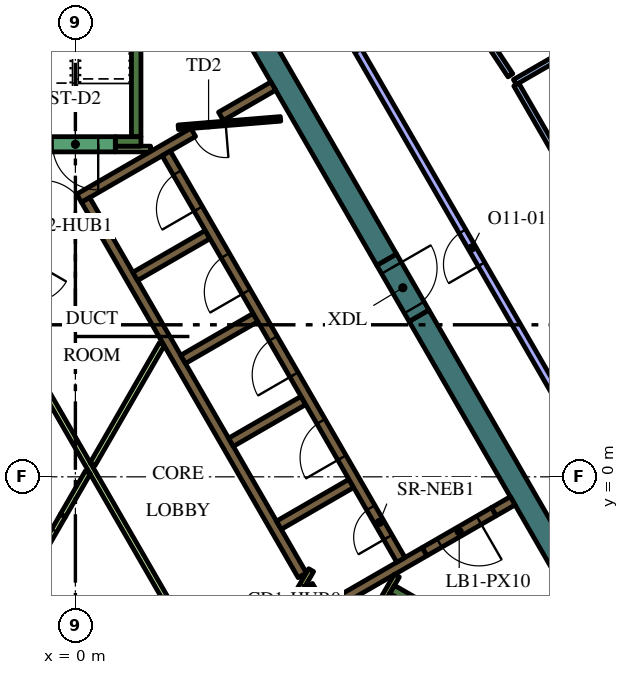
"""IFC4 building model, lengths in metres.
Left out: names, types, materials, properties, quantities, classifications, styles, units other than length and angle.
Written with IfcOpenShell. Run it as: python <this file> out.ifc"""

import sys

from ifc_helpers import new_model, si_unit, direction, frame, frame_2d, origin, place, context, subcontext, project, spatial, rectangle, extrude, element, fill, save


model = new_model("IFC4")
c1 = context("Model", 3, precision=1e-05, world=origin(), true_north=direction((0.0, 1.0)))
c2 = subcontext(c1, "Body", "Model", "MODEL_VIEW")
j1 = project(units=[si_unit("LENGTHUNIT", "METRE"), si_unit("PLANEANGLEUNIT", "RADIAN")], contexts=[c1])
p1 = place(None, origin())
s1 = spatial("IfcSite", under=j1, at=p1, CompositionType="ELEMENT")
p2 = place(p1, origin())
s2 = spatial("IfcBuilding", under=s1, at=p2, CompositionType="ELEMENT")
p3 = place(p2, frame((0.0, 0.0, 275.4)))
s3 = spatial("IfcBuildingStorey", under=s2, at=p3, CompositionType="ELEMENT", Elevation=275.4)
for number, where, z_axis, x_axis in (
    (1, (9.042, 4.239, 0.0), (0.0, 0.0, 1.0), (0.5, -0.866, 0.0)),
    (2, (1.989, 16.456, 0.0), (0.0, 0.0, 1.0), (0.5, -0.866, 0.0)),
):
    element("IfcWall", number, at=place(p3, frame(where, z_axis=z_axis, x_axis=x_axis)), inside=s3, PredefinedType="SOLIDWALL", context=c2, shape_type="SweptSolid", body=[
        extrude(rectangle(XDim=12.406, YDim=0.6, at=frame_2d((6.203, 0.0))), origin(), (0.0, 0.0, 1.0), 4.2),
    ])
p4 = place(p3, frame((8.334, -2.964, 0.0), z_axis=(0.0, 0.0, 1.0), x_axis=(0.866016039709, -0.500016218704, 0.0)))
e3 = element("IfcWall", 3, at=p4, inside=s3, PredefinedType="SOLIDWALL", context=c2, shape_type="SweptSolid", body=[
    extrude(rectangle(XDim=7.05, YDim=0.25, at=frame_2d((3.525, 0.0))), origin(), (0.0, 0.0, 1.0), 4.2),
])
p5 = place(p3, frame((8.168, -3.503, 0.0), z_axis=(0.0, 0.0, 1.0), x_axis=(0.49972245349, 0.866185586049, 0.0)))
e4 = element("IfcWall", 4, at=p5, inside=s3, PredefinedType="SOLIDWALL", context=c2, shape_type="SweptSolid", body=[
    extrude(rectangle(XDim=0.425, YDim=0.25, at=frame_2d((0.212, 0.0))), origin(), (0.0, 0.0, 1.0), 4.2),
])
p6 = place(p3, frame((1.6, 8.95, 0.0), z_axis=(0.0, 0.0, 1.0), x_axis=(0.0, 1.0, 0.0)))
e5 = element("IfcWall", 5, at=p6, inside=s3, PredefinedType="SOLIDWALL", context=c2, shape_type="SweptSolid", body=[
    extrude(rectangle(XDim=6.8, YDim=0.25, at=frame_2d((3.4, 0.0))), origin(), (0.0, 0.0, 1.0), 4.2),
])
p7 = place(p3, frame((1.05, 8.825, 0.0), z_axis=(0.0, 0.0, 1.0), x_axis=(1.0, 0.0, 0.0)))
e6 = element("IfcWall", 6, at=p7, inside=s3, PredefinedType="SOLIDWALL", context=c2, shape_type="SweptSolid", body=[
    extrude(rectangle(XDim=0.675, YDim=0.25, at=frame_2d((0.337, 0.0))), origin(), (0.0, 0.0, 1.0), 4.2),
])
p8 = place(p3, frame((9.19, -1.969, 0.0), z_axis=(0.0, 0.0, 1.0), x_axis=(-0.866057109641, -0.499945079824, 0.0)))
e7 = element("IfcWall", 7, at=p8, inside=s3, PredefinedType="SOLIDWALL", context=c2, shape_type="SweptSolid", body=[
    extrude(rectangle(XDim=3.291, YDim=0.25, at=frame_2d((1.646, 0.0))), origin(), (0.0, 0.0, 1.0), 4.2),
])
p9 = place(p3, frame((6.13, -2.867, 0.0), z_axis=(0.0, 0.0, 1.0), x_axis=(0.500160776593, -0.865932559475, 0.0)))
e8 = element("IfcWall", 8, at=p9, inside=s3, PredefinedType="SOLIDWALL", context=c2, shape_type="SweptSolid", body=[
    extrude(rectangle(XDim=0.627, YDim=0.25, at=frame_2d((0.313, 0.0))), origin(), (0.0, 0.0, 1.0), 4.2),
])
p10 = place(p3, frame((11.507, -0.631, 0.0), z_axis=(0.0, 0.0, 1.0), x_axis=(-0.866093731455, -0.499881634324, 0.0)))
e9 = element("IfcWall", 9, at=p10, inside=s3, PredefinedType="SOLIDWALL", context=c2, shape_type="SweptSolid", body=[
    extrude(rectangle(XDim=0.575, YDim=0.25, at=frame_2d((0.288, 0.0))), origin(), (0.0, 0.0, 1.0), 4.2),
])
p11 = place(p3, frame((3.1, 9.064, 0.0), z_axis=(0.0, 0.0, 1.0), x_axis=(-0.866033137035, -0.499986605379, 0.0)))
e10 = element("IfcWall", 10, at=p11, inside=s3, PredefinedType="SOLIDWALL", context=c2, shape_type="SweptSolid", body=[
    extrude(rectangle(XDim=3.467, YDim=0.25, at=frame_2d((1.733, 0.0))), origin(), (0.0, 0.0, 1.0), 4.2),
])
p12 = place(p3, frame((0.268, 7.285, 0.0), z_axis=(0.0, 0.0, 1.0), x_axis=(0.500098681536, -0.865968422476, 0.0)))
e11 = element("IfcWall", 11, at=p12, inside=s3, PredefinedType="SOLIDWALL", context=c2, shape_type="SweptSolid", body=[
    extrude(rectangle(XDim=0.636, YDim=0.25, at=frame_2d((0.318, 0.0))), origin(), (0.0, 0.0, 1.0), 4.2),
])
p13 = place(p3, frame((5.97, -2.591, 0.0), z_axis=(0.0, 0.0, 1.0), x_axis=(-0.499994469932, 0.866028596547, 0.0)))
e12 = element("IfcWall", 12, at=p13, inside=s3, PredefinedType="SOLIDWALL", context=c2, shape_type="SweptSolid", body=[
    extrude(rectangle(XDim=10.488, YDim=0.25, at=frame_2d((5.244, 0.0))), origin(), (0.0, 0.0, 1.0), 4.2),
])
p14 = place(p3, frame((1.574, 5.274, 0.0), z_axis=(0.0, 0.0, 1.0), x_axis=(0.866028486751, 0.499994660107, 0.0)))
e13 = element("IfcWall", 13, at=p14, inside=s3, PredefinedType="SOLIDWALL", context=c2, shape_type="SweptSolid", body=[
    extrude(rectangle(XDim=2.2, YDim=0.25, at=frame_2d((1.1, 0.0))), origin(), (0.0, 0.0, 1.0), 4.2),
])
for number, where, z_axis, x_axis in (
    (14, (2.834, 3.091, 0.0), (0.0, 0.0, 1.0), (0.866, 0.5, 0.0)),
    (15, (4.094, 0.909, 0.0), (0.0, 0.0, 1.0), (0.866, 0.5, 0.0)),
    (16, (5.354, -1.274, 0.0), (0.0, 0.0, 1.0), (0.866, 0.5, 0.0)),
):
    element("IfcWall", number, at=place(p3, frame(where, z_axis=z_axis, x_axis=x_axis)), inside=s3, PredefinedType="SOLIDWALL", context=c2, shape_type="SweptSolid", body=[
        extrude(rectangle(XDim=2.2, YDim=0.25, at=frame_2d((1.1, 0.0))), origin(), (0.0, 0.0, 1.0), 4.2),
    ])
p15 = place(p3, frame((3.83, 9.486, 0.0), z_axis=(0.0, 0.0, 1.0), x_axis=(0.865986202621, 0.500067892261, 0.0)))
e17 = element("IfcWall", 17, at=p15, inside=s3, PredefinedType="SOLIDWALL", context=c2, shape_type="SweptSolid", body=[
    extrude(rectangle(XDim=1.591, YDim=0.25, at=frame_2d((0.795, 0.0))), origin(), (0.0, 0.0, 1.0), 4.2),
])
p16 = place(p3, frame((1.05, 8.625, 0.0), z_axis=(0.0, 0.0, 1.0), x_axis=(1.0, 0.0, 0.0)))
e18 = element("IfcWall", 18, at=p16, inside=s3, PredefinedType="PARTITIONING", context=c2, shape_type="SweptSolid", body=[
    extrude(rectangle(XDim=0.929, YDim=0.15, at=frame_2d((0.464, 0.0))), origin(), (0.0, 0.0, 1.0), 3.55),
])
p17 = place(p3, frame((8.459, -2.599, 0.0), z_axis=(0.0, 0.0, 1.0), x_axis=(-0.500041054325, -0.866001699761, 0.0)))
e19 = element("IfcWall", 19, at=p17, inside=s3, PredefinedType="PARTITIONING", context=c2, shape_type="SweptSolid", body=[
    extrude(rectangle(XDim=0.929, YDim=0.15, at=frame_2d((0.464, 0.0))), origin(), (0.0, 0.0, 1.0), 4.2),
])
p18 = place(p3, frame((-1.887, 4.168, 0.0), z_axis=(0.0, 0.0, 1.0), x_axis=(0.499997069472, -0.866027095719, 0.0)))
e20 = element("IfcWall", 20, at=p18, inside=s3, PredefinedType="PARTITIONING", context=c2, shape_type="SweptSolid", body=[
    extrude(rectangle(XDim=9.106, YDim=0.15, at=frame_2d((4.553, 0.0))), origin(), (0.0, 0.0, 1.0), 3.55),
])
p19 = place(p3, frame((-0.329, -1.021, 0.0), z_axis=(0.0, 0.0, 1.0), x_axis=(0.500033191285, 0.866006239939, 0.0)))
e21 = element("IfcWall", 21, at=p19, inside=s3, PredefinedType="PARTITIONING", context=c2, shape_type="SweptSolid", body=[
    extrude(rectangle(XDim=1.315, YDim=0.15, at=frame_2d((0.657, 0.0))), origin(), (0.0, 0.0, 1.0), 3.55),
])
p20 = place(p3, frame((2.277, 3.493, 0.0), z_axis=(0.0, 0.0, 1.0), x_axis=(-0.499994550825, -0.866028549844, 0.0)))
e22 = element("IfcWall", 22, at=p20, inside=s3, PredefinedType="PARTITIONING", context=c2, shape_type="SweptSolid", body=[
    extrude(rectangle(XDim=3.65, YDim=0.15, at=frame_2d((1.825, 0.0))), origin(), (0.0, 0.0, 1.0), 3.55),
])
p21 = place(p3, frame((8.565, -2.185, 0.0), z_axis=(0.0, 0.0, 1.0), x_axis=(-0.499997954832, 0.866026584559, 0.0)))
e23 = element("IfcWall", 23, at=p21, inside=s3, PredefinedType="SOLIDWALL", context=c2, shape_type="SweptSolid", body=[
    extrude(rectangle(XDim=12.35, YDim=0.25, at=frame_2d((6.175, 0.0))), origin(), (0.0, 0.0, 1.0), 4.2),
])
p22 = place(p21, frame((0.685, 0.0, 0.0)))
e24 = element("IfcOpeningElement", 24, at=p22, cuts=e23, PredefinedType="OPENING", context=c2, shape_type="SweptSolid", body=[
    extrude(rectangle(XDim=0.9, YDim=2.1, at=frame_2d((0.45, 1.05))), frame((0.0, 0.135, 0.0), z_axis=(0.0, -1.0, 0.0), x_axis=(1.0, 0.0, 0.0)), (0.0, 0.0, 1.0), 0.27),
])
p23 = place(p21, frame((3.105, 0.0, 0.0)))
e25 = element("IfcOpeningElement", 25, at=p23, cuts=e23, PredefinedType="OPENING", context=c2, shape_type="SweptSolid", body=[
    extrude(rectangle(XDim=1.1, YDim=2.1, at=frame_2d((0.55, 1.05))), frame((0.0, 0.135, 0.0), z_axis=(0.0, -1.0, 0.0), x_axis=(1.0, 0.0, 0.0)), (0.0, 0.0, 1.0), 0.27),
])
p24 = place(p21, frame((5.625, 0.0, 0.0)))
e26 = element("IfcOpeningElement", 26, at=p24, cuts=e23, PredefinedType="OPENING", context=c2, shape_type="SweptSolid", body=[
    extrude(rectangle(XDim=1.1, YDim=2.1, at=frame_2d((0.55, 1.05))), frame((0.0, 0.135, 0.0), z_axis=(0.0, -1.0, 0.0), x_axis=(1.0, 0.0, 0.0)), (0.0, 0.0, 1.0), 0.27),
])
p25 = place(p21, frame((8.145, 0.0, 0.0)))
e27 = element("IfcOpeningElement", 27, at=p25, cuts=e23, PredefinedType="OPENING", context=c2, shape_type="SweptSolid", body=[
    extrude(rectangle(XDim=1.1, YDim=2.1, at=frame_2d((0.55, 1.05))), frame((0.0, 0.135, 0.0), z_axis=(0.0, -1.0, 0.0), x_axis=(1.0, 0.0, 0.0)), (0.0, 0.0, 1.0), 0.27),
])
p26 = place(p21, frame((10.665, 0.0, 0.0)))
e28 = element("IfcOpeningElement", 28, at=p26, cuts=e23, PredefinedType="OPENING", context=c2, shape_type="SweptSolid", body=[
    extrude(rectangle(XDim=1.1, YDim=2.1, at=frame_2d((0.55, 1.05))), frame((0.0, 0.135, 0.0), z_axis=(0.0, -1.0, 0.0), x_axis=(1.0, 0.0, 0.0)), (0.0, 0.0, 1.0), 0.27),
])
p27 = place(p3, frame((1.05, 8.75, 0.0), z_axis=(0.0, 0.0, 1.0), x_axis=(-1.0, 0.0, 0.0)))
e29 = element("IfcWall", 29, at=p27, inside=s3, PredefinedType="SOLIDWALL", context=c2, shape_type="SweptSolid", body=[
    extrude(rectangle(XDim=2.1, YDim=0.4, at=frame_2d((1.05, 0.0))), origin(), (0.0, 0.0, 1.0), 4.2),
])
p28 = place(p27, frame((0.45, 0.0, 0.0)))
e30 = element("IfcOpeningElement", 30, at=p28, cuts=e29, PredefinedType="OPENING", context=c2, shape_type="SweptSolid", body=[
    extrude(rectangle(XDim=1.2, YDim=2.1, at=frame_2d((0.6, 1.05))), frame((0.0, 0.21, 0.0), z_axis=(0.0, -1.0, 0.0), x_axis=(1.0, 0.0, 0.0)), (0.0, 0.0, 1.0), 0.42),
])
p29 = place(p3, frame((5.398, 9.419, 0.0), z_axis=(0.0, 0.0, 1.0), x_axis=(-0.996653416376, -0.081743303248, 0.0)))
e31 = element("IfcWall", 31, at=p29, inside=s3, PredefinedType="PARTITIONING", context=c2, shape_type="SweptSolid", body=[
    extrude(rectangle(XDim=2.7, YDim=0.12, at=frame_2d((1.35, 0.0))), origin(), (0.0, 0.0, 1.0), 3.55),
])
p30 = place(p29, frame((1.45, 0.0, 0.0)))
e32 = element("IfcOpeningElement", 32, at=p30, cuts=e31, PredefinedType="OPENING", context=c2, shape_type="SweptSolid", body=[
    extrude(rectangle(XDim=0.9, YDim=2.1, at=frame_2d((0.45, 1.05))), frame((0.0, 0.07, 0.0), z_axis=(0.0, -1.0, 0.0), x_axis=(1.0, 0.0, 0.0)), (0.0, 0.0, 1.0), 0.14),
])
p31 = place(p3, frame((6.203, -2.456, 0.0), z_axis=(0.0, 0.0, 1.0), x_axis=(-0.500043961785, -0.866000020948, 0.0)))
e33 = element("IfcWall", 33, at=p31, inside=s3, PredefinedType="PARTITIONING", context=c2, shape_type="SweptSolid", body=[
    extrude(rectangle(XDim=1.95, YDim=0.15, at=frame_2d((0.975, 0.0))), origin(), (0.0, 0.0, 1.0), 4.2),
])
p32 = place(p31, frame((0.45, 0.0, 0.0)))
e34 = element("IfcOpeningElement", 34, at=p32, cuts=e33, PredefinedType="OPENING", context=c2, shape_type="SweptSolid", body=[
    extrude(rectangle(XDim=0.9, YDim=2.1, at=frame_2d((0.45, 1.05))), frame((0.0, 0.085, 0.0), z_axis=(0.0, -1.0, 0.0), x_axis=(1.0, 0.0, 0.0)), (0.0, 0.0, 1.0), 0.17),
])
p33 = place(p3, frame((-1.303, 6.6, 0.0), z_axis=(0.0, 0.0, 1.0), x_axis=(1.0, 0.0, 0.0)))
e35 = element("IfcWall", 35, at=p33, inside=s3, PredefinedType="PARTITIONING", context=c2, shape_type="SweptSolid", body=[
    extrude(rectangle(XDim=2.1, YDim=0.15, at=frame_2d((1.05, 0.0))), origin(), (0.0, 0.0, 1.0), 4.2),
])
p34 = place(p33, frame((0.45, 0.0, 0.0)))
e36 = element("IfcOpeningElement", 36, at=p34, cuts=e35, PredefinedType="OPENING", context=c2, shape_type="SweptSolid", body=[
    extrude(rectangle(XDim=1.2, YDim=2.1, at=frame_2d((0.6, 1.05))), frame((0.0, 0.085, 0.0), z_axis=(0.0, -1.0, 0.0), x_axis=(1.0, 0.0, 0.0)), (0.0, 0.0, 1.0), 0.17),
])
p35 = place(p3, frame((11.009, -0.919, 0.0), z_axis=(0.0, 0.0, 1.0), x_axis=(-0.866059744384, -0.49994051562, 0.0)))
e37 = element("IfcWall", 37, at=p35, inside=s3, PredefinedType="SOLIDWALL", context=c2, shape_type="SweptSolid", body=[
    extrude(rectangle(XDim=2.1, YDim=0.25, at=frame_2d((1.05, 0.0))), origin(), (0.0, 0.0, 1.0), 4.2),
])
p36 = place(p35, frame((0.45, 0.0, 0.0)))
e38 = element("IfcOpeningElement", 38, at=p36, cuts=e37, PredefinedType="OPENING", context=c2, shape_type="SweptSolid", body=[
    extrude(rectangle(XDim=1.2, YDim=2.1, at=frame_2d((0.6, 1.05))), frame((0.0, 0.135, 0.0), z_axis=(0.0, -1.0, 0.0), x_axis=(1.0, 0.0, 0.0)), (0.0, 0.0, 1.0), 0.27),
])
p37 = place(p3, frame((8.192, 5.711, 0.0), z_axis=(0.0, 0.0, 1.0), x_axis=(0.500062241894, -0.865989465428, 0.0)))
e39 = element("IfcWall", 39, at=p37, inside=s3, PredefinedType="SOLIDWALL", context=c2, shape_type="SweptSolid", body=[
    extrude(rectangle(XDim=1.7, YDim=0.6, at=frame_2d((0.85, 0.0))), origin(), (0.0, 0.0, 1.0), 4.2),
])
p38 = place(p37, frame((0.25, 0.0, 0.0)))
e40 = element("IfcOpeningElement", 40, at=p38, cuts=e39, PredefinedType="OPENING", context=c2, shape_type="SweptSolid", body=[
    extrude(rectangle(XDim=1.2, YDim=2.1, at=frame_2d((0.6, 1.05))), frame((0.0, 0.31, 0.0), z_axis=(0.0, -1.0, 0.0), x_axis=(1.0, 0.0, 0.0)), (0.0, 0.0, 1.0), 0.62),
])
p39 = place(p3, frame((-1.229, -2.579, 0.0), z_axis=(0.0, 0.0, 1.0), x_axis=(0.500062916607, 0.865989075817, 0.0)))
e41 = element("IfcWall", 41, at=p39, inside=s3, PredefinedType="PARTITIONING", context=c2, shape_type="SweptSolid", body=[
    extrude(rectangle(XDim=1.8, YDim=0.15, at=frame_2d((0.9, 0.0))), origin(), (0.0, 0.0, 1.0), 3.55),
])
p40 = place(p39, frame((0.45, 0.0, 0.0)))
e42 = element("IfcOpeningElement", 42, at=p40, cuts=e41, PredefinedType="OPENING", context=c2, shape_type="SweptSolid", body=[
    extrude(rectangle(XDim=0.9, YDim=2.1, at=frame_2d((0.45, 1.05))), frame((0.0, 0.085, 0.0), z_axis=(0.0, -1.0, 0.0), x_axis=(1.0, 0.0, 0.0)), (0.0, 0.0, 1.0), 0.17),
])
p41 = place(p3, frame((11.564, 10.387, 0.0), z_axis=(0.0, 0.0, 1.0), x_axis=(0.86604641216, 0.499963610661, 0.0)))
e43 = element("IfcWall", 43, at=p41, inside=s3, PredefinedType="PARTITIONING", context=c2, shape_type="SweptSolid", body=[
    extrude(rectangle(XDim=3.096, YDim=0.15, at=frame_2d((1.548, 0.0))), origin(), (0.0, 0.0, 1.0), 3.55),
])
p42 = place(p3, frame((11.602, 10.322, 0.0), z_axis=(0.0, 0.0, 1.0), x_axis=(0.499989914735, -0.866031226437, 0.0)))
e44 = element("IfcWall", 44, at=p42, inside=s3, PredefinedType="PARTITIONING", context=c2, shape_type="SweptSolid", body=[
    extrude(rectangle(XDim=6.137, YDim=0.15, at=frame_2d((3.068, 0.0))), origin(), (0.0, 0.0, 1.0), 3.55),
])
p43 = place(p42, frame((2.637, 0.0, 0.0)))
e45 = element("IfcOpeningElement", 45, at=p43, cuts=e44, PredefinedType="OPENING", context=c2, shape_type="SweptSolid", body=[
    extrude(rectangle(XDim=0.9, YDim=2.1, at=frame_2d((0.45, 1.05))), frame((0.0, 0.085, 0.0), z_axis=(0.0, -1.0, 0.0), x_axis=(1.0, 0.0, 0.0)), (0.0, 0.0, 1.0), 0.17),
])
p44 = place(p3, frame((9.795, 13.068, 0.0), z_axis=(0.0, 0.0, 1.0), x_axis=(0.550767347659, -0.834658809786, 0.0)))
e46 = element("IfcWall", 46, at=p44, inside=s3, PredefinedType="PARTITIONING", context=c2, shape_type="SweptSolid", body=[
    extrude(rectangle(XDim=2.999, YDim=0.15, at=frame_2d((1.5, 0.0))), origin(), (0.0, 0.0, 1.0), 3.55),
])
p45 = place(p44, frame((1.099, 0.0, 0.0)))
e47 = element("IfcOpeningElement", 47, at=p45, cuts=e46, PredefinedType="OPENING", context=c2, shape_type="SweptSolid", body=[
    extrude(rectangle(XDim=0.9, YDim=2.1, at=frame_2d((0.45, 1.05))), frame((0.0, 0.085, 0.0), z_axis=(0.0, -1.0, 0.0), x_axis=(1.0, 0.0, 0.0)), (0.0, 0.0, 1.0), 0.17),
])
p46 = place(p3, frame((13.436, 0.829, 0.0), z_axis=(0.0, 0.0, 1.0), x_axis=(-0.49999894854, 0.866026010844, 0.0)))
e48 = element("IfcWall", 48, at=p46, inside=s3, PredefinedType="PARTITIONING", context=c2, shape_type="SweptSolid", body=[
    extrude(rectangle(XDim=12.0, YDim=0.2, at=frame_2d((6.0, 0.0))), origin(), (0.0, 0.0, 1.0), 3.55),
])
p47 = place(p46, frame((5.5, 0.0, 0.0)))
e49 = element("IfcOpeningElement", 49, at=p47, cuts=e48, PredefinedType="OPENING", context=c2, shape_type="SweptSolid", body=[
    extrude(rectangle(XDim=1.0, YDim=2.1, at=frame_2d((0.5, 1.05))), frame((0.0, 0.11, 0.0), z_axis=(0.0, -1.0, 0.0), x_axis=(1.0, 0.0, 0.0)), (0.0, 0.0, 1.0), 0.22),
])
p48 = place(p22, origin())
e50 = element("IfcDoor", 50, at=p48, inside=s3, OperationType="SINGLE_SWING_LEFT", PredefinedType="DOOR", context=c2, shape_type="SweptSolid", body=[
    extrude(rectangle(XDim=0.9, YDim=2.1, at=frame_2d((0.45, 1.05))), frame((0.0, 0.025, 0.0), z_axis=(0.0, -1.0, 0.0), x_axis=(1.0, 0.0, 0.0)), (0.0, 0.0, 1.0), 0.05),
])
fill(e24, e50)
p49 = place(p23, origin())
e51 = element("IfcDoor", 51, at=p49, inside=s3, OperationType="DOUBLE_DOOR_SLIDING", PredefinedType="DOOR", context=c2, shape_type="SweptSolid", body=[
    extrude(rectangle(XDim=1.1, YDim=2.1, at=frame_2d((0.55, 1.05))), frame((0.0, 0.025, 0.0), z_axis=(0.0, -1.0, 0.0), x_axis=(1.0, 0.0, 0.0)), (0.0, 0.0, 1.0), 0.05),
])
fill(e25, e51)
p50 = place(p24, origin())
e52 = element("IfcDoor", 52, at=p50, inside=s3, OperationType="DOUBLE_DOOR_SLIDING", PredefinedType="DOOR", context=c2, shape_type="SweptSolid", body=[
    extrude(rectangle(XDim=1.1, YDim=2.1, at=frame_2d((0.55, 1.05))), frame((0.0, 0.025, 0.0), z_axis=(0.0, -1.0, 0.0), x_axis=(1.0, 0.0, 0.0)), (0.0, 0.0, 1.0), 0.05),
])
fill(e26, e52)
p51 = place(p25, origin())
e53 = element("IfcDoor", 53, at=p51, inside=s3, OperationType="DOUBLE_DOOR_SLIDING", PredefinedType="DOOR", context=c2, shape_type="SweptSolid", body=[
    extrude(rectangle(XDim=1.1, YDim=2.1, at=frame_2d((0.55, 1.05))), frame((0.0, 0.025, 0.0), z_axis=(0.0, -1.0, 0.0), x_axis=(1.0, 0.0, 0.0)), (0.0, 0.0, 1.0), 0.05),
])
fill(e27, e53)
p52 = place(p26, origin())
e54 = element("IfcDoor", 54, at=p52, inside=s3, OperationType="DOUBLE_DOOR_SLIDING", PredefinedType="DOOR", context=c2, shape_type="SweptSolid", body=[
    extrude(rectangle(XDim=1.1, YDim=2.1, at=frame_2d((0.55, 1.05))), frame((0.0, 0.025, 0.0), z_axis=(0.0, -1.0, 0.0), x_axis=(1.0, 0.0, 0.0)), (0.0, 0.0, 1.0), 0.05),
])
fill(e28, e54)
p53 = place(p28, origin())
e55 = element("IfcDoor", 55, at=p53, inside=s3, OperationType="SINGLE_SWING_LEFT", PredefinedType="DOOR", context=c2, shape_type="SweptSolid", body=[
    extrude(rectangle(XDim=1.2, YDim=2.1, at=frame_2d((0.6, 1.05))), frame((0.0, 0.025, 0.0), z_axis=(0.0, -1.0, 0.0), x_axis=(1.0, 0.0, 0.0)), (0.0, 0.0, 1.0), 0.05),
])
fill(e30, e55)
p54 = place(p30, origin())
e56 = element("IfcDoor", 56, at=p54, inside=s3, OperationType="SINGLE_SWING_LEFT", PredefinedType="DOOR", context=c2, shape_type="SweptSolid", body=[
    extrude(rectangle(XDim=0.9, YDim=2.1, at=frame_2d((0.45, 1.05))), frame((0.0, 0.025, 0.0), z_axis=(0.0, -1.0, 0.0), x_axis=(1.0, 0.0, 0.0)), (0.0, 0.0, 1.0), 0.05),
])
fill(e32, e56)
p55 = place(p32, origin())
e57 = element("IfcDoor", 57, at=p55, inside=s3, OperationType="SINGLE_SWING_LEFT", PredefinedType="DOOR", context=c2, shape_type="SweptSolid", body=[
    extrude(rectangle(XDim=0.9, YDim=2.1, at=frame_2d((0.45, 1.05))), frame((0.0, 0.025, 0.0), z_axis=(0.0, -1.0, 0.0), x_axis=(1.0, 0.0, 0.0)), (0.0, 0.0, 1.0), 0.05),
])
fill(e34, e57)
p56 = place(p34, origin())
e58 = element("IfcDoor", 58, at=p56, inside=s3, OperationType="SINGLE_SWING_LEFT", PredefinedType="DOOR", context=c2, shape_type="SweptSolid", body=[
    extrude(rectangle(XDim=1.2, YDim=2.1, at=frame_2d((0.6, 1.05))), frame((0.0, 0.025, 0.0), z_axis=(0.0, -1.0, 0.0), x_axis=(1.0, 0.0, 0.0)), (0.0, 0.0, 1.0), 0.05),
])
fill(e36, e58)
p57 = place(p36, origin())
e59 = element("IfcDoor", 59, at=p57, inside=s3, OperationType="SINGLE_SWING_LEFT", PredefinedType="DOOR", context=c2, shape_type="SweptSolid", body=[
    extrude(rectangle(XDim=1.2, YDim=2.1, at=frame_2d((0.6, 1.05))), frame((0.0, 0.025, 0.0), z_axis=(0.0, -1.0, 0.0), x_axis=(1.0, 0.0, 0.0)), (0.0, 0.0, 1.0), 0.05),
])
fill(e38, e59)
p58 = place(p38, origin())
e60 = element("IfcDoor", 60, at=p58, inside=s3, OperationType="SINGLE_SWING_LEFT", PredefinedType="DOOR", context=c2, shape_type="SweptSolid", body=[
    extrude(rectangle(XDim=1.2, YDim=2.1, at=frame_2d((0.6, 1.05))), frame((0.0, 0.025, 0.0), z_axis=(0.0, -1.0, 0.0), x_axis=(1.0, 0.0, 0.0)), (0.0, 0.0, 1.0), 0.05),
])
fill(e40, e60)
p59 = place(p40, origin())
e61 = element("IfcDoor", 61, at=p59, inside=s3, OperationType="SINGLE_SWING_LEFT", PredefinedType="DOOR", context=c2, shape_type="SweptSolid", body=[
    extrude(rectangle(XDim=0.9, YDim=2.1, at=frame_2d((0.45, 1.05))), frame((0.0, 0.025, 0.0), z_axis=(0.0, -1.0, 0.0), x_axis=(1.0, 0.0, 0.0)), (0.0, 0.0, 1.0), 0.05),
])
fill(e42, e61)
p60 = place(p47, origin())
e62 = element("IfcDoor", 62, at=p60, inside=s3, OperationType="SINGLE_SWING_RIGHT", PredefinedType="DOOR", context=c2, shape_type="SweptSolid", body=[
    extrude(rectangle(XDim=1.0, YDim=2.1, at=frame_2d((0.5, 1.05))), frame((0.0, 0.025, 0.0), z_axis=(0.0, -1.0, 0.0), x_axis=(1.0, 0.0, 0.0)), (0.0, 0.0, 1.0), 0.05),
])
fill(e49, e62)
save(model, sys.argv[1])
